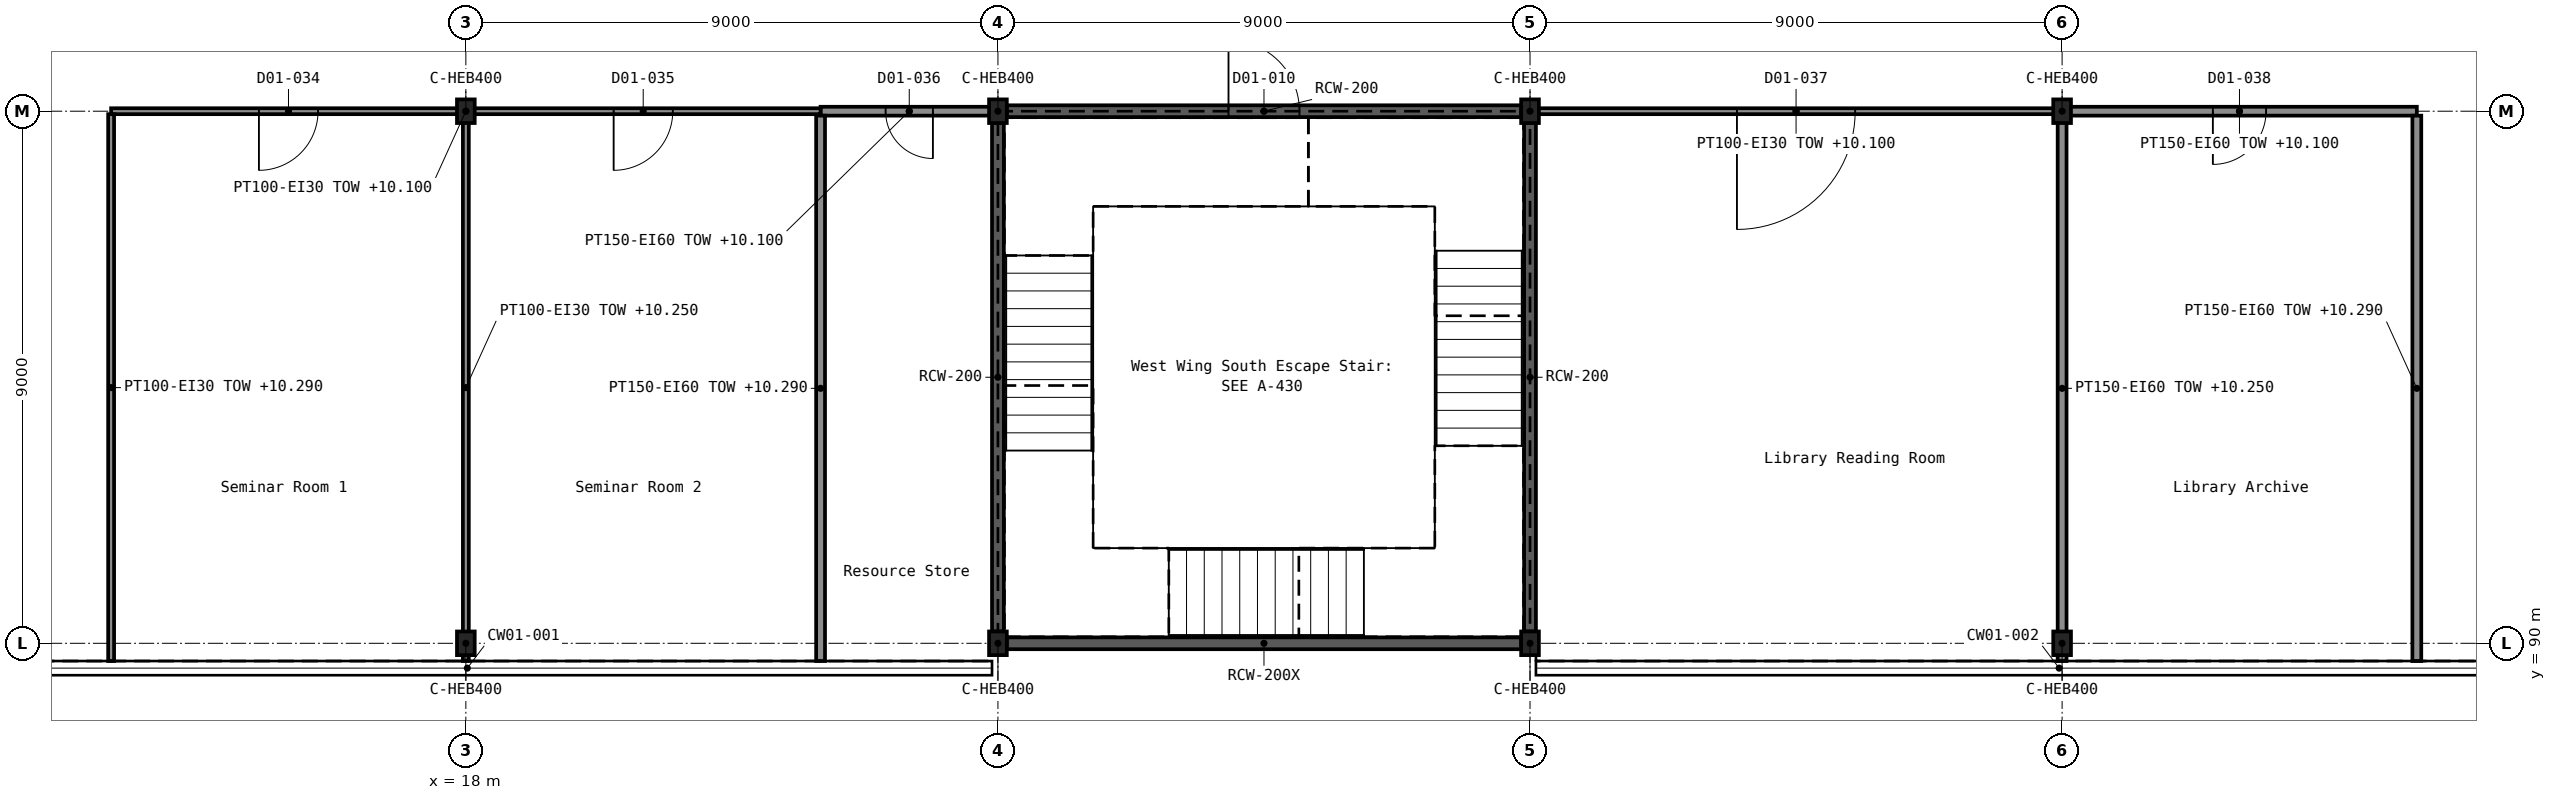
"""IFC4 building model, lengths in metres.
Left out: names, types, materials, properties, quantities, classifications, styles, units other than length and angle.
Written with IfcOpenShell. Run it as: python <this file> out.ifc"""

import sys

from ifc_helpers import new_model, si_unit, direction, frame, frame_2d, origin, origin_2d, place, context, subcontext, project, spatial, rectangle, i_section, extrude, element, fill, save


model = new_model("IFC4")
c1 = context("Model", 3, precision=1e-05, world=origin(), true_north=direction((0.0, 1.0)))
c2 = subcontext(c1, "Body", "Model", "MODEL_VIEW")
j1 = project(units=[si_unit("LENGTHUNIT", "METRE"), si_unit("PLANEANGLEUNIT", "RADIAN")], contexts=[c1])
p1 = place(None, origin())
s1 = spatial("IfcSite", under=j1, at=p1, CompositionType="ELEMENT")
p2 = place(p1, origin())
s2 = spatial("IfcBuilding", under=s1, at=p2, CompositionType="ELEMENT")
p3 = place(p2, frame((0.0, 0.0, 5.4)))
s3 = spatial("IfcBuildingStorey", under=s2, at=p3, CompositionType="ELEMENT", Elevation=5.4)
for number, where, z_axis, x_axis in (
    (1, (18.0, 90.0, 0.0), (0.0, 0.0, 1.0), (1.0, 0.0, 0.0)),
    (2, (27.0, 90.0, 0.0), (0.0, 0.0, 1.0), (1.0, 0.0, 0.0)),
    (3, (36.0, 90.0, 0.0), (0.0, 0.0, 1.0), (1.0, 0.0, 0.0)),
    (4, (45.0, 90.0, 0.0), (0.0, 0.0, 1.0), (1.0, 0.0, 0.0)),
    (5, (18.0, 99.0, 0.0), (0.0, 0.0, 1.0), (1.0, 0.0, 0.0)),
    (6, (27.0, 99.0, 0.0), (0.0, 0.0, 1.0), (1.0, 0.0, 0.0)),
    (7, (36.0, 99.0, 0.0), (0.0, 0.0, 1.0), (1.0, 0.0, 0.0)),
    (8, (45.0, 99.0, 0.0), (0.0, 0.0, 1.0), (1.0, 0.0, 0.0)),
):
    element("IfcColumn", number, at=place(p3, frame(where, z_axis=z_axis, x_axis=x_axis)), inside=s3, PredefinedType="COLUMN", context=c2, shape_type="SweptSolid", body=[
        extrude(i_section(OverallWidth=0.3, OverallDepth=0.4, WebThickness=0.013, FlangeThickness=0.024, FilletRadius=0.027, at=origin_2d()), origin(), (0.0, 0.0, 1.0), 5.4),
    ])
p4 = place(p3, frame((27.15, 90.0, 0.0), z_axis=(0.0, 0.0, 1.0), x_axis=(1.0, 0.0, 0.0)))
e9 = element("IfcWall", 9, at=p4, inside=s3, PredefinedType="SHEAR", context=c2, shape_type="SweptSolid", body=[
    extrude(rectangle(XDim=8.7, YDim=0.2, at=frame_2d((4.35, 0.0))), origin(), (0.0, 0.0, 1.0), 5.4),
])
p5 = place(p3, frame((27.15, 99.0, 0.0), z_axis=(0.0, 0.0, 1.0), x_axis=(1.0, 0.0, 0.0)))
e10 = element("IfcWall", 10, at=p5, inside=s3, PredefinedType="SHEAR", context=c2, shape_type="SweptSolid", body=[
    extrude(rectangle(XDim=8.7, YDim=0.2, at=frame_2d((4.35, 0.0))), origin(), (0.0, 0.0, 1.0), 5.4),
])
p6 = place(p5, frame((3.75, 0.0, 0.0)))
e11 = element("IfcOpeningElement", 11, at=p6, cuts=e10, PredefinedType="OPENING", context=c2, shape_type="SweptSolid", body=[
    extrude(rectangle(XDim=1.2, YDim=2.1, at=frame_2d((0.6, 1.05))), frame((0.0, 0.111, 0.0), z_axis=(0.0, -1.0, 0.0), x_axis=(1.0, 0.0, 0.0)), (0.0, 0.0, 1.0), 0.222),
])
for number, where, z_axis, x_axis in (
    (12, (27.0, 90.2, 0.0), (0.0, 0.0, 1.0), (0.0, 1.0, 0.0)),
    (13, (36.0, 90.2, 0.0), (0.0, 0.0, 1.0), (0.0, 1.0, 0.0)),
):
    element("IfcWall", number, at=place(p3, frame(where, z_axis=z_axis, x_axis=x_axis)), inside=s3, PredefinedType="SHEAR", context=c2, shape_type="SweptSolid", body=[
        extrude(rectangle(XDim=8.6, YDim=0.2, at=frame_2d((4.3, 0.0))), origin(), (0.0, 0.0, 1.0), 5.4),
    ])
p7 = place(p3, frame((24.0, 99.0, 0.0), z_axis=(0.0, 0.0, 1.0), x_axis=(1.0, 0.0, 0.0)))
e14 = element("IfcWall", 14, at=p7, inside=s3, PredefinedType="PARTITIONING", context=c2, shape_type="SweptSolid", body=[
    extrude(rectangle(XDim=3.0, YDim=0.15, at=frame_2d((1.5, 0.0))), origin(), (0.0, 0.0, 1.0), 4.7),
])
p8 = place(p7, frame((1.1, 0.0, 0.0)))
e15 = element("IfcOpeningElement", 15, at=p8, cuts=e14, PredefinedType="OPENING", context=c2, shape_type="SweptSolid", body=[
    extrude(rectangle(XDim=0.8, YDim=2.1, at=frame_2d((0.4, 1.05))), frame((0.0, 0.086, 0.0), z_axis=(0.0, -1.0, 0.0), x_axis=(1.0, 0.0, 0.0)), (0.0, 0.0, 1.0), 0.172),
])
p9 = place(p3, frame((45.0, 99.0, 0.0), z_axis=(0.0, 0.0, 1.0), x_axis=(1.0, 0.0, 0.0)))
e16 = element("IfcWall", 16, at=p9, inside=s3, PredefinedType="PARTITIONING", context=c2, shape_type="SweptSolid", body=[
    extrude(rectangle(XDim=6.0, YDim=0.15, at=frame_2d((3.0, 0.0))), origin(), (0.0, 0.0, 1.0), 4.7),
])
p10 = place(p9, frame((2.55, 0.0, 0.0)))
e17 = element("IfcOpeningElement", 17, at=p10, cuts=e16, PredefinedType="OPENING", context=c2, shape_type="SweptSolid", body=[
    extrude(rectangle(XDim=0.9, YDim=2.4, at=frame_2d((0.45, 1.2))), frame((0.0, 0.086, 0.0), z_axis=(0.0, -1.0, 0.0), x_axis=(1.0, 0.0, 0.0)), (0.0, 0.0, 1.0), 0.172),
])
p11 = place(p3, frame((24.0, 89.7, 0.0), z_axis=(0.0, 0.0, 1.0), x_axis=(0.0, 1.0, 0.0)))
e18 = element("IfcWall", 18, at=p11, inside=s3, PredefinedType="PARTITIONING", context=c2, shape_type="SweptSolid", body=[
    extrude(rectangle(XDim=9.225, YDim=0.15, at=frame_2d((4.613, 0.0))), origin(), (0.0, 0.0, 1.0), 4.89),
])
p12 = place(p3, frame((45.0, 89.7, 0.0), z_axis=(0.0, 0.0, 1.0), x_axis=(0.0, 1.0, 0.0)))
e19 = element("IfcWall", 19, at=p12, inside=s3, PredefinedType="PARTITIONING", context=c2, shape_type="SweptSolid", body=[
    extrude(rectangle(XDim=9.225, YDim=0.15, at=frame_2d((4.613, 0.0))), origin(), (0.0, 0.0, 1.0), 4.85),
])
p13 = place(p3, frame((51.0, 89.7, 0.0), z_axis=(0.0, 0.0, 1.0), x_axis=(0.0, 1.0, 0.0)))
e20 = element("IfcWall", 20, at=p13, inside=s3, PredefinedType="PARTITIONING", context=c2, shape_type="SweptSolid", body=[
    extrude(rectangle(XDim=9.225, YDim=0.15, at=frame_2d((4.613, 0.0))), origin(), (0.0, 0.0, 1.0), 4.89),
])
p14 = place(p3, frame((12.0, 99.0, 0.0), z_axis=(0.0, 0.0, 1.0), x_axis=(1.0, 0.0, 0.0)))
e21 = element("IfcWall", 21, at=p14, inside=s3, PredefinedType="PARTITIONING", context=c2, shape_type="SweptSolid", body=[
    extrude(rectangle(XDim=12.0, YDim=0.1, at=frame_2d((6.0, 0.0))), origin(), (0.0, 0.0, 1.0), 4.7),
])
p15 = place(p14, frame((2.5, 0.0, 0.0)))
e22 = element("IfcOpeningElement", 22, at=p15, cuts=e21, PredefinedType="OPENING", context=c2, shape_type="SweptSolid", body=[
    extrude(rectangle(XDim=1.0, YDim=2.1, at=frame_2d((0.5, 1.05))), frame((0.0, 0.061, 0.0), z_axis=(0.0, -1.0, 0.0), x_axis=(1.0, 0.0, 0.0)), (0.0, 0.0, 1.0), 0.122),
])
p16 = place(p14, frame((8.5, 0.0, 0.0)))
e23 = element("IfcOpeningElement", 23, at=p16, cuts=e21, PredefinedType="OPENING", context=c2, shape_type="SweptSolid", body=[
    extrude(rectangle(XDim=1.0, YDim=2.1, at=frame_2d((0.5, 1.05))), frame((0.0, 0.061, 0.0), z_axis=(0.0, -1.0, 0.0), x_axis=(1.0, 0.0, 0.0)), (0.0, 0.0, 1.0), 0.122),
])
p17 = place(p3, frame((36.0, 99.0, 0.0), z_axis=(0.0, 0.0, 1.0), x_axis=(1.0, 0.0, 0.0)))
e24 = element("IfcWall", 24, at=p17, inside=s3, PredefinedType="PARTITIONING", context=c2, shape_type="SweptSolid", body=[
    extrude(rectangle(XDim=9.0, YDim=0.1, at=frame_2d((4.5, 0.0))), origin(), (0.0, 0.0, 1.0), 4.7),
])
p18 = place(p17, frame((3.5, 0.0, 0.0)))
e25 = element("IfcOpeningElement", 25, at=p18, cuts=e24, PredefinedType="OPENING", context=c2, shape_type="SweptSolid", body=[
    extrude(rectangle(XDim=2.0, YDim=2.1, at=frame_2d((1.0, 1.05))), frame((0.0, 0.061, 0.0), z_axis=(0.0, -1.0, 0.0), x_axis=(1.0, 0.0, 0.0)), (0.0, 0.0, 1.0), 0.122),
])
p19 = place(p3, frame((12.0, 89.7, 0.0), z_axis=(0.0, 0.0, 1.0), x_axis=(0.0, 1.0, 0.0)))
e26 = element("IfcWall", 26, at=p19, inside=s3, PredefinedType="PARTITIONING", context=c2, shape_type="SweptSolid", body=[
    extrude(rectangle(XDim=9.25, YDim=0.1, at=frame_2d((4.625, 0.0))), origin(), (0.0, 0.0, 1.0), 4.89),
])
p20 = place(p3, frame((18.0, 89.7, 0.0), z_axis=(0.0, 0.0, 1.0), x_axis=(0.0, 1.0, 0.0)))
e27 = element("IfcWall", 27, at=p20, inside=s3, PredefinedType="PARTITIONING", context=c2, shape_type="SweptSolid", body=[
    extrude(rectangle(XDim=9.25, YDim=0.1, at=frame_2d((4.625, 0.0))), origin(), (0.0, 0.0, 1.0), 4.85),
])
p21 = place(p6, origin())
e28 = element("IfcDoor", 28, at=p21, inside=s3, OperationType="SINGLE_SWING_LEFT", PredefinedType="DOOR", context=c2, shape_type="SweptSolid", body=[
    extrude(rectangle(XDim=1.2, YDim=2.1, at=frame_2d((0.6, 1.05))), frame((0.0, 0.025, 0.0), z_axis=(0.0, -1.0, 0.0), x_axis=(1.0, 0.0, 0.0)), (0.0, 0.0, 1.0), 0.05),
])
fill(e11, e28)
p22 = place(p15, frame((1.0, 0.0, 0.0), z_axis=(0.0, 0.0, 1.0), x_axis=(-1.0, 0.0, 0.0)))
e29 = element("IfcDoor", 29, at=p22, inside=s3, OperationType="SINGLE_SWING_RIGHT", PredefinedType="DOOR", context=c2, shape_type="SweptSolid", body=[
    extrude(rectangle(XDim=1.0, YDim=2.1, at=frame_2d((0.5, 1.05))), frame((0.0, 0.025, 0.0), z_axis=(0.0, -1.0, 0.0), x_axis=(1.0, 0.0, 0.0)), (0.0, 0.0, 1.0), 0.05),
])
fill(e22, e29)
p23 = place(p16, frame((1.0, 0.0, 0.0), z_axis=(0.0, 0.0, 1.0), x_axis=(-1.0, 0.0, 0.0)))
e30 = element("IfcDoor", 30, at=p23, inside=s3, OperationType="SINGLE_SWING_RIGHT", PredefinedType="DOOR", context=c2, shape_type="SweptSolid", body=[
    extrude(rectangle(XDim=1.0, YDim=2.1, at=frame_2d((0.5, 1.05))), frame((0.0, 0.025, 0.0), z_axis=(0.0, -1.0, 0.0), x_axis=(1.0, 0.0, 0.0)), (0.0, 0.0, 1.0), 0.05),
])
fill(e23, e30)
p24 = place(p8, frame((0.8, 0.0, 0.0), z_axis=(0.0, 0.0, 1.0), x_axis=(-1.0, 0.0, 0.0)))
e31 = element("IfcDoor", 31, at=p24, inside=s3, OperationType="SINGLE_SWING_LEFT", PredefinedType="DOOR", context=c2, shape_type="SweptSolid", body=[
    extrude(rectangle(XDim=0.8, YDim=2.1, at=frame_2d((0.4, 1.05))), frame((0.0, 0.025, 0.0), z_axis=(0.0, -1.0, 0.0), x_axis=(1.0, 0.0, 0.0)), (0.0, 0.0, 1.0), 0.05),
])
fill(e15, e31)
p25 = place(p18, frame((2.0, 0.0, 0.0), z_axis=(0.0, 0.0, 1.0), x_axis=(-1.0, 0.0, 0.0)))
e32 = element("IfcDoor", 32, at=p25, inside=s3, OperationType="DOUBLE_DOOR_SINGLE_SWING", PredefinedType="DOOR", context=c2, shape_type="SweptSolid", body=[
    extrude(rectangle(XDim=2.0, YDim=2.1, at=frame_2d((1.0, 1.05))), frame((0.0, 0.025, 0.0), z_axis=(0.0, -1.0, 0.0), x_axis=(1.0, 0.0, 0.0)), (0.0, 0.0, 1.0), 0.05),
])
fill(e25, e32)
p26 = place(p10, frame((0.9, 0.0, 0.0), z_axis=(0.0, 0.0, 1.0), x_axis=(-1.0, 0.0, 0.0)))
e33 = element("IfcDoor", 33, at=p26, inside=s3, OperationType="SINGLE_SWING_RIGHT", PredefinedType="DOOR", context=c2, shape_type="SweptSolid", body=[
    extrude(rectangle(XDim=0.9, YDim=2.4, at=frame_2d((0.45, 1.2))), frame((0.0, 0.025, 0.0), z_axis=(0.0, -1.0, 0.0), x_axis=(1.0, 0.0, 0.0)), (0.0, 0.0, 1.0), 0.05),
])
fill(e17, e33)
save(model, sys.argv[1])
